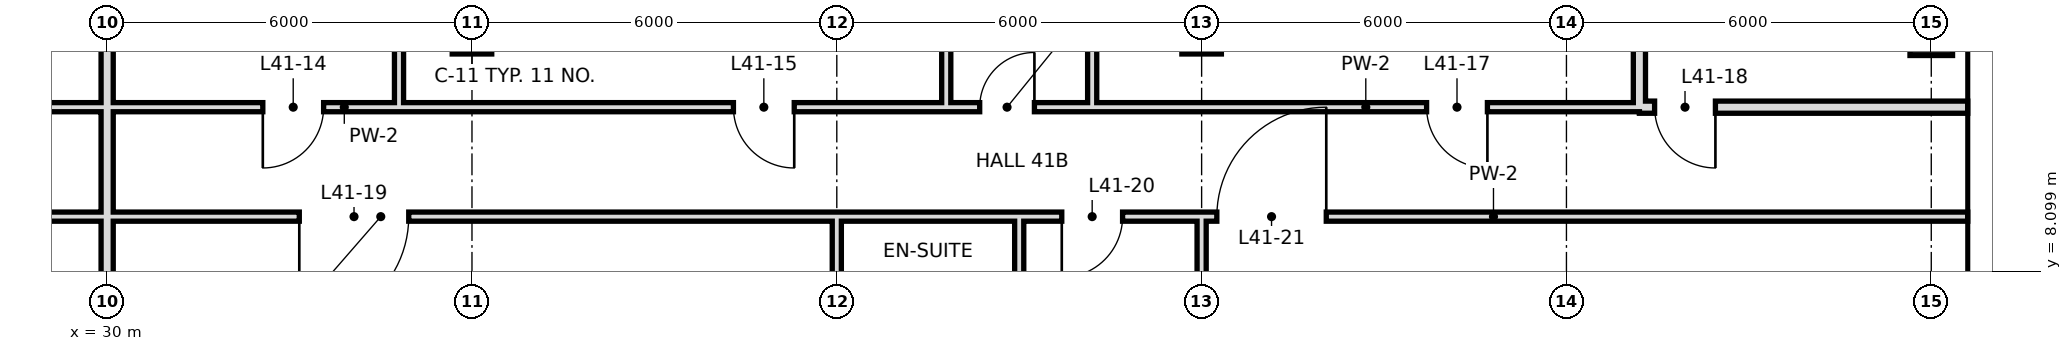
"""IFC4 building model, lengths in metres.
Left out: names, types, materials, properties, quantities, classifications, styles, units other than length and angle.
Written with IfcOpenShell. Run it as: python <this file> out.ifc"""

import sys

from ifc_helpers import new_model, si_unit, direction, frame, frame_2d, origin, origin_2d, place, context, subcontext, project, spatial, rectangle, hollow_rectangle, extrude, element, fill, save


model = new_model("IFC4")
c1 = context("Model", 3, precision=1e-05, world=origin(), true_north=direction((0.0, 1.0)))
c2 = subcontext(c1, "Body", "Model", "MODEL_VIEW")
j1 = project(units=[si_unit("LENGTHUNIT", "METRE"), si_unit("PLANEANGLEUNIT", "RADIAN")], contexts=[c1])
p1 = place(None, origin())
s1 = spatial("IfcSite", under=j1, at=p1, CompositionType="ELEMENT")
p2 = place(p1, origin())
s2 = spatial("IfcBuilding", under=s1, at=p2, CompositionType="ELEMENT")
p3 = place(p2, frame((0.0, 0.0, 178.0)))
s3 = spatial("IfcBuildingStorey", under=s2, at=p3, CompositionType="ELEMENT", Elevation=178.0)
for number, where, z_axis, x_axis in (
    (1, (36.0, 12.0, 0.0), (0.0, 0.0, 1.0), (1.0, 0.0, 0.0)),
    (2, (48.0, 12.0, 0.0), (0.0, 0.0, 1.0), (1.0, 0.0, 0.0)),
):
    element("IfcColumn", number, at=place(p3, frame(where, z_axis=z_axis, x_axis=x_axis)), inside=s3, PredefinedType="COLUMN", context=c2, shape_type="SweptSolid", body=[
        extrude(hollow_rectangle(XDim=0.65, YDim=0.65, WallThickness=0.032, at=origin_2d()), origin(), (0.0, 0.0, 1.0), 3.6),
    ])
p4 = place(p3, frame((60.0, 12.0, 0.0), z_axis=(0.0, 0.0, 1.0), x_axis=(1.0, 0.0, 0.0)))
e3 = element("IfcColumn", 3, at=p4, inside=s3, PredefinedType="COLUMN", context=c2, shape_type="SweptSolid", body=[
    extrude(hollow_rectangle(XDim=0.7, YDim=0.7, WallThickness=0.036, at=origin_2d()), origin(), (0.0, 0.0, 1.0), 3.6),
])
p5 = place(p3, frame((30.0, -0.6, 0.0), z_axis=(0.0, 0.0, 1.0), x_axis=(0.0, 1.0, 0.0)))
e4 = element("IfcWall", 4, at=p5, inside=s3, PredefinedType="SOLIDWALL", context=c2, shape_type="SweptSolid", body=[
    extrude(rectangle(XDim=15.9, YDim=0.2, at=frame_2d((7.95, 0.0))), origin(), (0.0, 0.0, 1.0), 2.72),
])
p6 = place(p3, frame((34.8, 10.8, 0.0), z_axis=(0.0, 0.0, 1.0), x_axis=(0.0, 1.0, 0.0)))
e5 = element("IfcWall", 5, at=p6, inside=s3, PredefinedType="PARTITIONING", context=c2, shape_type="SweptSolid", body=[
    extrude(rectangle(XDim=4.5, YDim=0.15, at=frame_2d((2.25, 0.0))), origin(), (0.0, 0.0, 1.0), 3.42),
])
p7 = place(p3, frame((42.0, 6.0, 0.0), z_axis=(0.0, 0.0, 1.0), x_axis=(0.0, 1.0, 0.0)))
e6 = element("IfcWall", 6, at=p7, inside=s3, PredefinedType="PARTITIONING", context=c2, shape_type="SweptSolid", body=[
    extrude(rectangle(XDim=3.0, YDim=0.15, at=frame_2d((1.5, 0.0))), origin(), (0.0, 0.0, 1.0), 2.72),
])
p8 = place(p3, frame((43.8, 10.8, 0.0), z_axis=(0.0, 0.0, 1.0), x_axis=(0.0, 1.0, 0.0)))
e7 = element("IfcWall", 7, at=p8, inside=s3, PredefinedType="PARTITIONING", context=c2, shape_type="SweptSolid", body=[
    extrude(rectangle(XDim=4.5, YDim=0.15, at=frame_2d((2.25, 0.0))), origin(), (0.0, 0.0, 1.0), 3.42),
])
p9 = place(p3, frame((45.0, 6.0, 0.0), z_axis=(0.0, 0.0, 1.0), x_axis=(0.0, 1.0, 0.0)))
e8 = element("IfcWall", 8, at=p9, inside=s3, PredefinedType="PARTITIONING", context=c2, shape_type="SweptSolid", body=[
    extrude(rectangle(XDim=3.0, YDim=0.15, at=frame_2d((1.5, 0.0))), origin(), (0.0, 0.0, 1.0), 3.42),
])
p10 = place(p3, frame((46.2, 10.8, 0.0), z_axis=(0.0, 0.0, 1.0), x_axis=(0.0, 1.0, 0.0)))
e9 = element("IfcWall", 9, at=p10, inside=s3, PredefinedType="PARTITIONING", context=c2, shape_type="SweptSolid", body=[
    extrude(rectangle(XDim=4.5, YDim=0.15, at=frame_2d((2.25, 0.0))), origin(), (0.0, 0.0, 1.0), 3.42),
])
p11 = place(p3, frame((48.0, 0.0, 0.0), z_axis=(0.0, 0.0, 1.0), x_axis=(0.0, 1.0, 0.0)))
e10 = element("IfcWall", 10, at=p11, inside=s3, PredefinedType="PARTITIONING", context=c2, shape_type="SweptSolid", body=[
    extrude(rectangle(XDim=9.0, YDim=0.15, at=frame_2d((4.5, 0.0))), origin(), (0.0, 0.0, 1.0), 2.72),
])
p12 = place(p3, frame((55.2, 10.8, 0.0), z_axis=(0.0, 0.0, 1.0), x_axis=(0.0, 1.0, 0.0)))
e11 = element("IfcWall", 11, at=p12, inside=s3, PredefinedType="SOLIDWALL", context=c2, shape_type="SweptSolid", body=[
    extrude(rectangle(XDim=7.2, YDim=0.2, at=frame_2d((3.6, 0.0))), origin(), (0.0, 0.0, 1.0), 2.72),
])
p13 = place(p3, frame((55.2, 10.8, 0.0), z_axis=(0.0, 0.0, 1.0), x_axis=(1.0, 0.0, 0.0)))
e12 = element("IfcWall", 12, at=p13, inside=s3, PredefinedType="SOLIDWALL", context=c2, shape_type="SweptSolid", body=[
    extrude(rectangle(XDim=5.4, YDim=0.2, at=frame_2d((2.7, 0.0))), origin(), (0.0, 0.0, 1.0), 2.97),
])
p14 = place(p13, frame((0.25, 0.0, 0.0)))
e13 = element("IfcOpeningElement", 13, at=p14, cuts=e12, PredefinedType="OPENING", context=c2, shape_type="SweptSolid", body=[
    extrude(rectangle(XDim=1.0, YDim=2.4, at=frame_2d((0.5, 1.2))), frame((0.0, 0.11, 0.0), z_axis=(0.0, -1.0, 0.0), x_axis=(1.0, 0.0, 0.0)), (0.0, 0.0, 1.0), 0.22),
])
p15 = place(p3, frame((24.0, 10.8, 0.0), z_axis=(0.0, 0.0, 1.0), x_axis=(1.0, 0.0, 0.0)))
e14 = element("IfcWall", 14, at=p15, inside=s3, PredefinedType="PARTITIONING", context=c2, shape_type="SweptSolid", body=[
    extrude(rectangle(XDim=19.8, YDim=0.15, at=frame_2d((9.9, 0.0))), origin(), (0.0, 0.0, 1.0), 3.42),
])
p16 = place(p15, frame((2.5, 0.0, 0.0)))
e15 = element("IfcOpeningElement", 15, at=p16, cuts=e14, PredefinedType="OPENING", context=c2, shape_type="SweptSolid", body=[
    extrude(rectangle(XDim=1.0, YDim=2.4, at=frame_2d((0.5, 1.2))), frame((0.0, 0.085, 0.0), z_axis=(0.0, -1.0, 0.0), x_axis=(1.0, 0.0, 0.0)), (0.0, 0.0, 1.0), 0.17),
])
p17 = place(p15, frame((8.56, 0.0, 0.0)))
e16 = element("IfcOpeningElement", 16, at=p17, cuts=e14, PredefinedType="OPENING", context=c2, shape_type="SweptSolid", body=[
    extrude(rectangle(XDim=1.0, YDim=2.4, at=frame_2d((0.5, 1.2))), frame((0.0, 0.085, 0.0), z_axis=(0.0, -1.0, 0.0), x_axis=(1.0, 0.0, 0.0)), (0.0, 0.0, 1.0), 0.17),
])
p18 = place(p15, frame((16.3, 0.0, 0.0)))
e17 = element("IfcOpeningElement", 17, at=p18, cuts=e14, PredefinedType="OPENING", context=c2, shape_type="SweptSolid", body=[
    extrude(rectangle(XDim=1.0, YDim=2.4, at=frame_2d((0.5, 1.2))), frame((0.0, 0.085, 0.0), z_axis=(0.0, -1.0, 0.0), x_axis=(1.0, 0.0, 0.0)), (0.0, 0.0, 1.0), 0.17),
])
p19 = place(p3, frame((46.2, 10.8, 0.0), z_axis=(0.0, 0.0, 1.0), x_axis=(1.0, 0.0, 0.0)))
e18 = element("IfcWall", 18, at=p19, inside=s3, PredefinedType="PARTITIONING", context=c2, shape_type="SweptSolid", body=[
    extrude(rectangle(XDim=9.0, YDim=0.15, at=frame_2d((4.5, 0.0))), origin(), (0.0, 0.0, 1.0), 3.42),
])
p20 = place(p19, frame((5.5, 0.0, 0.0)))
e19 = element("IfcOpeningElement", 19, at=p20, cuts=e18, PredefinedType="OPENING", context=c2, shape_type="SweptSolid", body=[
    extrude(rectangle(XDim=1.0, YDim=2.4, at=frame_2d((0.5, 1.2))), frame((0.0, 0.085, 0.0), z_axis=(0.0, -1.0, 0.0), x_axis=(1.0, 0.0, 0.0)), (0.0, 0.0, 1.0), 0.17),
])
p21 = place(p3, frame((43.8, 10.8, 0.0), z_axis=(0.0, 0.0, 1.0), x_axis=(1.0, 0.0, 0.0)))
e20 = element("IfcWall", 20, at=p21, inside=s3, PredefinedType="PARTITIONING", context=c2, shape_type="SweptSolid", body=[
    extrude(rectangle(XDim=2.4, YDim=0.15, at=frame_2d((1.2, 0.0))), origin(), (0.0, 0.0, 1.0), 3.42),
])
p22 = place(p21, frame((0.55, 0.0, 0.0)))
e21 = element("IfcOpeningElement", 21, at=p22, cuts=e20, PredefinedType="OPENING", context=c2, shape_type="SweptSolid", body=[
    extrude(rectangle(XDim=0.9, YDim=2.4, at=frame_2d((0.45, 1.2))), frame((0.0, 0.085, 0.0), z_axis=(0.0, -1.0, 0.0), x_axis=(1.0, 0.0, 0.0)), (0.0, 0.0, 1.0), 0.17),
])
p23 = place(p3, frame((27.0, 9.0, 0.0), z_axis=(0.0, 0.0, 1.0), x_axis=(1.0, 0.0, 0.0)))
e22 = element("IfcWall", 22, at=p23, inside=s3, PredefinedType="PARTITIONING", context=c2, shape_type="SweptSolid", body=[
    extrude(rectangle(XDim=15.0, YDim=0.15, at=frame_2d((7.5, 0.0))), origin(), (0.0, 0.0, 1.0), 3.42),
])
p24 = place(p23, frame((1.0, 0.0, 0.0)))
e23 = element("IfcOpeningElement", 23, at=p24, cuts=e22, PredefinedType="OPENING", context=c2, shape_type="SweptSolid", body=[
    extrude(rectangle(XDim=1.0, YDim=2.4, at=frame_2d((0.5, 1.2))), frame((0.0, 0.085, 0.0), z_axis=(0.0, -1.0, 0.0), x_axis=(1.0, 0.0, 0.0)), (0.0, 0.0, 1.0), 0.17),
])
p25 = place(p23, frame((6.16, 0.0, 0.0)))
e24 = element("IfcOpeningElement", 24, at=p25, cuts=e22, PredefinedType="OPENING", context=c2, shape_type="SweptSolid", body=[
    extrude(rectangle(XDim=1.8, YDim=2.4, at=frame_2d((0.9, 1.2))), frame((0.0, 0.085, 0.0), z_axis=(0.0, -1.0, 0.0), x_axis=(1.0, 0.0, 0.0)), (0.0, 0.0, 1.0), 0.17),
])
p26 = place(p3, frame((45.0, 9.0, 0.0), z_axis=(0.0, 0.0, 1.0), x_axis=(1.0, 0.0, 0.0)))
e25 = element("IfcWall", 25, at=p26, inside=s3, PredefinedType="PARTITIONING", context=c2, shape_type="SweptSolid", body=[
    extrude(rectangle(XDim=15.6, YDim=0.15, at=frame_2d((7.8, 0.0))), origin(), (0.0, 0.0, 1.0), 3.42),
])
p27 = place(p26, frame((0.7, 0.0, 0.0)))
e26 = element("IfcOpeningElement", 26, at=p27, cuts=e25, PredefinedType="OPENING", context=c2, shape_type="SweptSolid", body=[
    extrude(rectangle(XDim=1.0, YDim=2.4, at=frame_2d((0.5, 1.2))), frame((0.0, 0.085, 0.0), z_axis=(0.0, -1.0, 0.0), x_axis=(1.0, 0.0, 0.0)), (0.0, 0.0, 1.0), 0.17),
])
p28 = place(p26, frame((3.25, 0.0, 0.0)))
e27 = element("IfcOpeningElement", 27, at=p28, cuts=e25, PredefinedType="OPENING", context=c2, shape_type="SweptSolid", body=[
    extrude(rectangle(XDim=1.8, YDim=2.4, at=frame_2d((0.9, 1.2))), frame((0.0, 0.085, 0.0), z_axis=(0.0, -1.0, 0.0), x_axis=(1.0, 0.0, 0.0)), (0.0, 0.0, 1.0), 0.17),
])
p29 = place(p3, frame((42.0, 9.0, 0.0), z_axis=(0.0, 0.0, 1.0), x_axis=(1.0, 0.0, 0.0)))
e28 = element("IfcWall", 28, at=p29, inside=s3, PredefinedType="PARTITIONING", context=c2, shape_type="SweptSolid", body=[
    extrude(rectangle(XDim=3.0, YDim=0.15, at=frame_2d((1.5, 0.0))), origin(), (0.0, 0.0, 1.0), 3.42),
])
p30 = place(p17, frame((1.0, 0.0, 0.0), z_axis=(0.0, 0.0, 1.0), x_axis=(-1.0, 0.0, 0.0)))
e29 = element("IfcDoor", 29, at=p30, inside=s3, OperationType="SINGLE_SWING_RIGHT", PredefinedType="DOOR", context=c2, shape_type="SweptSolid", body=[
    extrude(rectangle(XDim=1.0, YDim=2.4, at=frame_2d((0.5, 1.2))), frame((0.0, 0.025, 0.0), z_axis=(0.0, -1.0, 0.0), x_axis=(1.0, 0.0, 0.0)), (0.0, 0.0, 1.0), 0.05),
])
fill(e16, e29)
p31 = place(p18, origin())
e30 = element("IfcDoor", 30, at=p31, inside=s3, OperationType="SINGLE_SWING_RIGHT", PredefinedType="DOOR", context=c2, shape_type="SweptSolid", body=[
    extrude(rectangle(XDim=1.0, YDim=2.4, at=frame_2d((0.5, 1.2))), frame((0.0, 0.025, 0.0), z_axis=(0.0, -1.0, 0.0), x_axis=(1.0, 0.0, 0.0)), (0.0, 0.0, 1.0), 0.05),
])
fill(e17, e30)
p32 = place(p22, frame((0.9, 0.0, 0.0), z_axis=(0.0, 0.0, 1.0), x_axis=(-1.0, 0.0, 0.0)))
e31 = element("IfcDoor", 31, at=p32, inside=s3, OperationType="SINGLE_SWING_LEFT", PredefinedType="DOOR", context=c2, shape_type="SweptSolid", body=[
    extrude(rectangle(XDim=0.9, YDim=2.4, at=frame_2d((0.45, 1.2))), frame((0.0, 0.025, 0.0), z_axis=(0.0, -1.0, 0.0), x_axis=(1.0, 0.0, 0.0)), (0.0, 0.0, 1.0), 0.05),
])
fill(e21, e31)
p33 = place(p20, origin())
e32 = element("IfcDoor", 32, at=p33, inside=s3, OperationType="SINGLE_SWING_RIGHT", PredefinedType="DOOR", context=c2, shape_type="SweptSolid", body=[
    extrude(rectangle(XDim=1.0, YDim=2.4, at=frame_2d((0.5, 1.2))), frame((0.0, 0.025, 0.0), z_axis=(0.0, -1.0, 0.0), x_axis=(1.0, 0.0, 0.0)), (0.0, 0.0, 1.0), 0.05),
])
fill(e19, e32)
p34 = place(p14, origin())
e33 = element("IfcDoor", 33, at=p34, inside=s3, OperationType="SINGLE_SWING_RIGHT", PredefinedType="DOOR", context=c2, shape_type="SweptSolid", body=[
    extrude(rectangle(XDim=1.0, YDim=2.4, at=frame_2d((0.5, 1.2))), frame((0.0, 0.025, 0.0), z_axis=(0.0, -1.0, 0.0), x_axis=(1.0, 0.0, 0.0)), (0.0, 0.0, 1.0), 0.05),
])
fill(e13, e33)
p35 = place(p25, frame((1.8, 0.0, 0.0), z_axis=(0.0, 0.0, 1.0), x_axis=(-1.0, 0.0, 0.0)))
e34 = element("IfcDoor", 34, at=p35, inside=s3, OperationType="SINGLE_SWING_RIGHT", PredefinedType="DOOR", context=c2, shape_type="SweptSolid", body=[
    extrude(rectangle(XDim=1.8, YDim=2.4, at=frame_2d((0.9, 1.2))), frame((0.0, 0.025, 0.0), z_axis=(0.0, -1.0, 0.0), x_axis=(1.0, 0.0, 0.0)), (0.0, 0.0, 1.0), 0.05),
])
fill(e24, e34)
p36 = place(p27, frame((1.0, 0.0, 0.0), z_axis=(0.0, 0.0, 1.0), x_axis=(-1.0, 0.0, 0.0)))
e35 = element("IfcDoor", 35, at=p36, inside=s3, OperationType="SINGLE_SWING_RIGHT", PredefinedType="DOOR", context=c2, shape_type="SweptSolid", body=[
    extrude(rectangle(XDim=1.0, YDim=2.4, at=frame_2d((0.5, 1.2))), frame((0.0, 0.025, 0.0), z_axis=(0.0, -1.0, 0.0), x_axis=(1.0, 0.0, 0.0)), (0.0, 0.0, 1.0), 0.05),
])
fill(e26, e35)
p37 = place(p28, frame((1.8, 0.0, 0.0), z_axis=(0.0, 0.0, 1.0), x_axis=(-1.0, 0.0, 0.0)))
e36 = element("IfcDoor", 36, at=p37, inside=s3, OperationType="SINGLE_SWING_LEFT", PredefinedType="DOOR", context=c2, shape_type="SweptSolid", body=[
    extrude(rectangle(XDim=1.8, YDim=2.4, at=frame_2d((0.9, 1.2))), frame((0.0, 0.025, 0.0), z_axis=(0.0, -1.0, 0.0), x_axis=(1.0, 0.0, 0.0)), (0.0, 0.0, 1.0), 0.05),
])
fill(e27, e36)
save(model, sys.argv[1])
